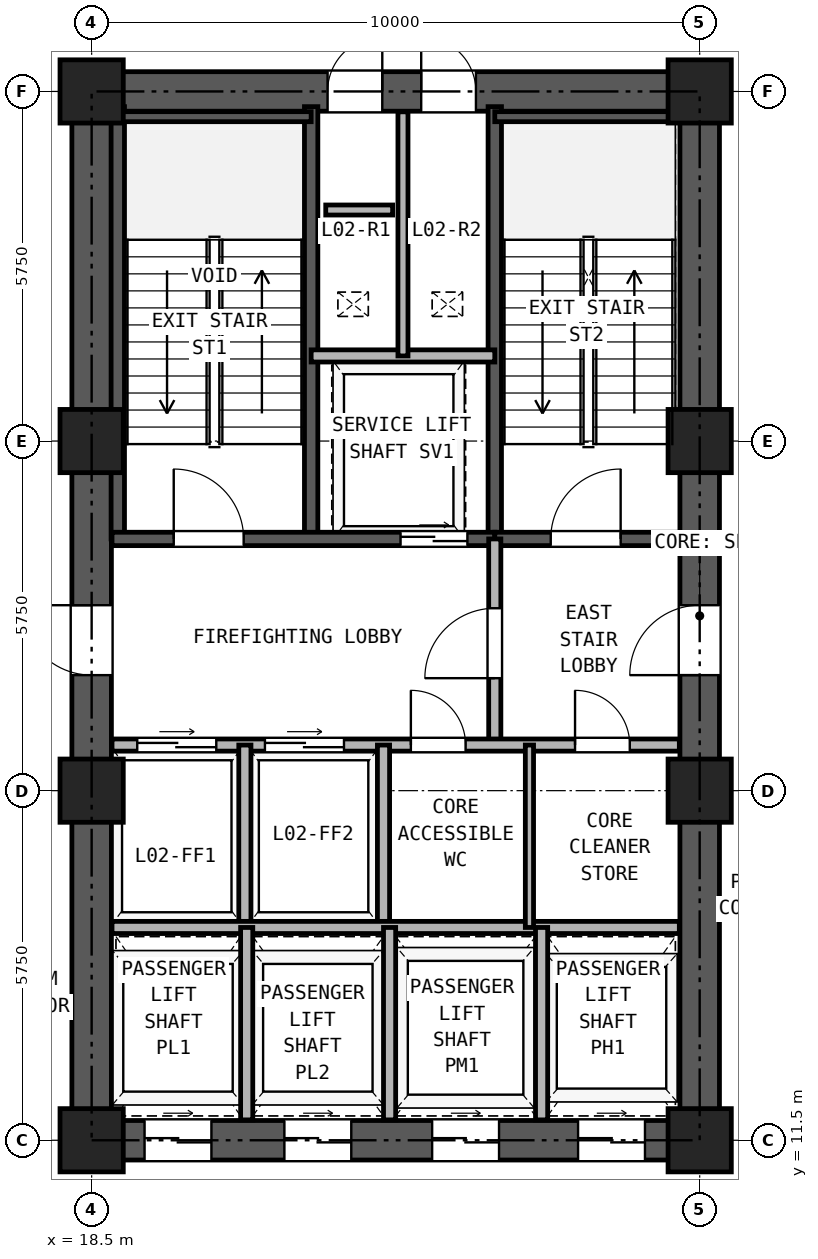
"""IFC4 building model, lengths in metres.
Left out: names, types, materials, properties, quantities, classifications, styles, units other than length and angle.
Written with IfcOpenShell. Run it as: python <this file> out.ifc"""

import sys

from ifc_helpers import new_model, si_unit, direction, frame, frame_2d, origin, origin_2d, place, context, subcontext, project, spatial, rectangle, hollow_rectangle, extrude, source, transform, mapped, element, fill, save


model = new_model("IFC4")
c1 = context("Model", 3, precision=1e-05, world=origin(), true_north=direction((0.0, 1.0)))
c2 = subcontext(c1, "Body", "Model", "MODEL_VIEW")
j1 = project(units=[si_unit("LENGTHUNIT", "METRE"), si_unit("PLANEANGLEUNIT", "RADIAN")], contexts=[c1])
p1 = place(None, origin())
s1 = spatial("IfcSite", under=j1, at=p1, CompositionType="ELEMENT")
p2 = place(p1, origin())
s2 = spatial("IfcBuilding", under=s1, at=p2, CompositionType="ELEMENT")
p3 = place(p2, frame((0.0, 0.0, 9.0)))
s3 = spatial("IfcBuildingStorey", under=s2, at=p3, CompositionType="ELEMENT", Elevation=9.0)
m1 = source(origin(), c2, "Body", "SweptSolid", [
    extrude(hollow_rectangle(XDim=1.04, YDim=1.04, WallThickness=0.065, at=origin_2d()), origin(), (0.0, 0.0, 1.0), 4.18),
])
for number, where, z_axis, x_axis in (
    (1, (18.5, 11.5, 0.0), (0.0, 0.0, 1.0), (1.0, 0.0, 0.0)),
    (2, (18.5, 17.25, 0.0), (0.0, 0.0, 1.0), (1.0, 0.0, 0.0)),
    (3, (18.5, 23.0, 0.0), (0.0, 0.0, 1.0), (1.0, 0.0, 0.0)),
    (4, (18.5, 28.75, 0.0), (0.0, 0.0, 1.0), (1.0, 0.0, 0.0)),
    (5, (28.5, 11.5, 0.0), (0.0, 0.0, 1.0), (1.0, 0.0, 0.0)),
    (6, (28.5, 17.25, 0.0), (0.0, 0.0, 1.0), (1.0, 0.0, 0.0)),
    (7, (28.5, 23.0, 0.0), (0.0, 0.0, 1.0), (1.0, 0.0, 0.0)),
    (8, (28.5, 28.75, 0.0), (0.0, 0.0, 1.0), (1.0, 0.0, 0.0)),
):
    element("IfcColumn", number, at=place(p3, frame(where, z_axis=z_axis, x_axis=x_axis)), inside=s3, PredefinedType="COLUMN", context=c2, shape_type="MappedRepresentation", body=[
        mapped(m1, transform((0.0, 0.0, 0.0), x_axis=(1.0, 0.0, 0.0), y_axis=(0.0, 1.0, 0.0), z_axis=(0.0, 0.0, 1.0), scale=1.0)),
    ])
p4 = place(p3, frame((18.175, 11.5, 0.0), z_axis=(0.0, 0.0, 1.0), x_axis=(1.0, 0.0, 0.0)))
e9 = element("IfcWall", 9, at=p4, inside=s3, PredefinedType="SHEAR", context=c2, shape_type="SweptSolid", body=[
    extrude(rectangle(XDim=10.65, YDim=0.65, at=frame_2d((5.325, 0.0))), origin(), (0.0, 0.0, 1.0), 4.18),
])
p5 = place(p4, frame((1.195, 0.0, 0.0)))
e10 = element("IfcOpeningElement", 10, at=p5, cuts=e9, PredefinedType="OPENING", context=c2, shape_type="SweptSolid", body=[
    extrude(rectangle(XDim=1.1, YDim=2.25, at=frame_2d((0.55, 1.125))), frame((0.0, 0.335, 0.0), z_axis=(0.0, -1.0, 0.0), x_axis=(1.0, 0.0, 0.0)), (0.0, 0.0, 1.0), 0.67),
])
p6 = place(p4, frame((3.495, 0.0, 0.0)))
e11 = element("IfcOpeningElement", 11, at=p6, cuts=e9, PredefinedType="OPENING", context=c2, shape_type="SweptSolid", body=[
    extrude(rectangle(XDim=1.1, YDim=2.25, at=frame_2d((0.55, 1.125))), frame((0.0, 0.335, 0.0), z_axis=(0.0, -1.0, 0.0), x_axis=(1.0, 0.0, 0.0)), (0.0, 0.0, 1.0), 0.67),
])
p7 = place(p4, frame((5.925, 0.0, 0.0)))
e12 = element("IfcOpeningElement", 12, at=p7, cuts=e9, PredefinedType="OPENING", context=c2, shape_type="SweptSolid", body=[
    extrude(rectangle(XDim=1.1, YDim=2.25, at=frame_2d((0.55, 1.125))), frame((0.0, 0.335, 0.0), z_axis=(0.0, -1.0, 0.0), x_axis=(1.0, 0.0, 0.0)), (0.0, 0.0, 1.0), 0.67),
])
p8 = place(p4, frame((8.325, 0.0, 0.0)))
e13 = element("IfcOpeningElement", 13, at=p8, cuts=e9, PredefinedType="OPENING", context=c2, shape_type="SweptSolid", body=[
    extrude(rectangle(XDim=1.1, YDim=2.25, at=frame_2d((0.55, 1.125))), frame((0.0, 0.335, 0.0), z_axis=(0.0, -1.0, 0.0), x_axis=(1.0, 0.0, 0.0)), (0.0, 0.0, 1.0), 0.67),
])
p9 = place(p3, frame((18.175, 28.75, 0.0), z_axis=(0.0, 0.0, 1.0), x_axis=(1.0, 0.0, 0.0)))
e14 = element("IfcWall", 14, at=p9, inside=s3, PredefinedType="SHEAR", context=c2, shape_type="SweptSolid", body=[
    extrude(rectangle(XDim=10.65, YDim=0.65, at=frame_2d((5.325, 0.0))), origin(), (0.0, 0.0, 1.0), 4.18),
])
p10 = place(p9, frame((4.205, 0.0, 0.0)))
e15 = element("IfcOpeningElement", 15, at=p10, cuts=e14, PredefinedType="OPENING", context=c2, shape_type="SweptSolid", body=[
    extrude(rectangle(XDim=0.9, YDim=2.05, at=frame_2d((0.45, 1.025))), frame((0.0, 0.335, 0.0), z_axis=(0.0, -1.0, 0.0), x_axis=(1.0, 0.0, 0.0)), (0.0, 0.0, 1.0), 0.67),
])
p11 = place(p9, frame((5.745, 0.0, 0.0)))
e16 = element("IfcOpeningElement", 16, at=p11, cuts=e14, PredefinedType="OPENING", context=c2, shape_type="SweptSolid", body=[
    extrude(rectangle(XDim=0.9, YDim=2.05, at=frame_2d((0.45, 1.025))), frame((0.0, 0.335, 0.0), z_axis=(0.0, -1.0, 0.0), x_axis=(1.0, 0.0, 0.0)), (0.0, 0.0, 1.0), 0.67),
])
p12 = place(p3, frame((18.5, 11.825, 0.0), z_axis=(0.0, 0.0, 1.0), x_axis=(0.0, 1.0, 0.0)))
e17 = element("IfcWall", 17, at=p12, inside=s3, PredefinedType="SHEAR", context=c2, shape_type="SweptSolid", body=[
    extrude(rectangle(XDim=16.6, YDim=0.65, at=frame_2d((8.3, 0.0))), origin(), (0.0, 0.0, 1.0), 4.18),
])
p13 = place(p12, frame((7.325, 0.0, 0.0)))
e18 = element("IfcOpeningElement", 18, at=p13, cuts=e17, PredefinedType="OPENING", context=c2, shape_type="SweptSolid", body=[
    extrude(rectangle(XDim=1.15, YDim=2.2, at=frame_2d((0.575, 1.1))), frame((0.0, 0.335, 0.0), z_axis=(0.0, -1.0, 0.0), x_axis=(1.0, 0.0, 0.0)), (0.0, 0.0, 1.0), 0.67),
])
p14 = place(p3, frame((28.5, 11.825, 0.0), z_axis=(0.0, 0.0, 1.0), x_axis=(0.0, 1.0, 0.0)))
e19 = element("IfcWall", 19, at=p14, inside=s3, PredefinedType="SHEAR", context=c2, shape_type="SweptSolid", body=[
    extrude(rectangle(XDim=16.6, YDim=0.65, at=frame_2d((8.3, 0.0))), origin(), (0.0, 0.0, 1.0), 4.18),
])
p15 = place(p14, frame((7.325, 0.0, 0.0)))
e20 = element("IfcOpeningElement", 20, at=p15, cuts=e19, PredefinedType="OPENING", context=c2, shape_type="SweptSolid", body=[
    extrude(rectangle(XDim=1.15, YDim=2.2, at=frame_2d((0.575, 1.1))), frame((0.0, 0.335, 0.0), z_axis=(0.0, -1.0, 0.0), x_axis=(1.0, 0.0, 0.0)), (0.0, 0.0, 1.0), 0.67),
])
for number, where, z_axis, x_axis in (
    (21, (18.93, 21.39, 0.0), (0.0, 0.0, 1.0), (0.0, 1.0, 0.0)),
    (22, (22.11, 21.39, 0.0), (0.0, 0.0, 1.0), (0.0, 1.0, 0.0)),
    (23, (25.13, 21.39, 0.0), (0.0, 0.0, 1.0), (0.0, 1.0, 0.0)),
):
    element("IfcWall", number, at=place(p3, frame(where, z_axis=z_axis, x_axis=x_axis)), inside=s3, PredefinedType="SOLIDWALL", context=c2, shape_type="SweptSolid", body=[
        extrude(rectangle(XDim=7.11, YDim=0.22, at=frame_2d((3.555, 0.0))), origin(), (0.0, 0.0, 1.0), 4.18),
    ])
p16 = place(p3, frame((18.835, 28.335, 0.0), z_axis=(0.0, 0.0, 1.0), x_axis=(1.0, 0.0, 0.0)))
e24 = element("IfcWall", 24, at=p16, inside=s3, PredefinedType="PARTITIONING", context=c2, shape_type="SweptSolid", body=[
    extrude(rectangle(XDim=3.275, YDim=0.165, at=frame_2d((1.638, 0.0))), origin(), (0.0, 0.0, 1.0), 4.18),
])
p17 = place(p3, frame((25.13, 28.335, 0.0), z_axis=(0.0, 0.0, 1.0), x_axis=(1.0, 0.0, 0.0)))
e25 = element("IfcWall", 25, at=p17, inside=s3, PredefinedType="PARTITIONING", context=c2, shape_type="SweptSolid", body=[
    extrude(rectangle(XDim=3.035, YDim=0.165, at=frame_2d((1.518, 0.0))), origin(), (0.0, 0.0, 1.0), 4.18),
])
p18 = place(p3, frame((18.835, 21.39, 0.0), z_axis=(0.0, 0.0, 1.0), x_axis=(1.0, 0.0, 0.0)))
e26 = element("IfcWall", 26, at=p18, inside=s3, PredefinedType="SOLIDWALL", context=c2, shape_type="SweptSolid", body=[
    extrude(rectangle(XDim=6.295, YDim=0.22, at=frame_2d((3.147, 0.0))), origin(), (0.0, 0.0, 1.0), 4.18),
])
p19 = place(p18, frame((1.015, 0.0, 0.0)))
e27 = element("IfcOpeningElement", 27, at=p19, cuts=e26, PredefinedType="OPENING", context=c2, shape_type="SweptSolid", body=[
    extrude(rectangle(XDim=1.15, YDim=2.2, at=frame_2d((0.575, 1.1))), frame((0.0, 0.12, 0.0), z_axis=(0.0, -1.0, 0.0), x_axis=(1.0, 0.0, 0.0)), (0.0, 0.0, 1.0), 0.24),
])
p20 = place(p18, frame((4.745, 0.0, 0.0)))
e28 = element("IfcOpeningElement", 28, at=p20, cuts=e26, PredefinedType="OPENING", context=c2, shape_type="SweptSolid", body=[
    extrude(rectangle(XDim=1.1, YDim=2.25, at=frame_2d((0.55, 1.125))), frame((0.0, 0.12, 0.0), z_axis=(0.0, -1.0, 0.0), x_axis=(1.0, 0.0, 0.0)), (0.0, 0.0, 1.0), 0.24),
])
p21 = place(p3, frame((25.13, 21.39, 0.0), z_axis=(0.0, 0.0, 1.0), x_axis=(1.0, 0.0, 0.0)))
e29 = element("IfcWall", 29, at=p21, inside=s3, PredefinedType="SOLIDWALL", context=c2, shape_type="SweptSolid", body=[
    extrude(rectangle(XDim=3.035, YDim=0.22, at=frame_2d((1.518, 0.0))), origin(), (0.0, 0.0, 1.0), 4.18),
])
p22 = place(p21, frame((0.92, 0.0, 0.0)))
e30 = element("IfcOpeningElement", 30, at=p22, cuts=e29, PredefinedType="OPENING", context=c2, shape_type="SweptSolid", body=[
    extrude(rectangle(XDim=1.15, YDim=2.2, at=frame_2d((0.575, 1.1))), frame((0.0, 0.12, 0.0), z_axis=(0.0, -1.0, 0.0), x_axis=(1.0, 0.0, 0.0)), (0.0, 0.0, 1.0), 0.24),
])
p23 = place(p3, frame((22.11, 24.4, 0.0), z_axis=(0.0, 0.0, 1.0), x_axis=(1.0, 0.0, 0.0)))
e31 = element("IfcWall", 31, at=p23, inside=s3, PredefinedType="PARTITIONING", context=c2, shape_type="SweptSolid", body=[
    extrude(rectangle(XDim=3.02, YDim=0.2, at=frame_2d((1.51, 0.0))), origin(), (0.0, 0.0, 1.0), 4.18),
])
p24 = place(p3, frame((23.62, 24.4, 0.0), z_axis=(0.0, 0.0, 1.0), x_axis=(0.0, 1.0, 0.0)))
e32 = element("IfcWall", 32, at=p24, inside=s3, PredefinedType="PARTITIONING", context=c2, shape_type="SweptSolid", body=[
    extrude(rectangle(XDim=4.015, YDim=0.165, at=frame_2d((2.008, 0.0))), origin(), (0.0, 0.0, 1.0), 4.18),
])
p25 = place(p3, frame((25.13, 18.0, 0.0), z_axis=(0.0, 0.0, 1.0), x_axis=(0.0, 1.0, 0.0)))
e33 = element("IfcWall", 33, at=p25, inside=s3, PredefinedType="PARTITIONING", context=c2, shape_type="SweptSolid", body=[
    extrude(rectangle(XDim=3.39, YDim=0.2, at=frame_2d((1.695, 0.0))), origin(), (0.0, 0.0, 1.0), 4.18),
])
p26 = place(p25, frame((1.1, 0.0, 0.0)))
e34 = element("IfcOpeningElement", 34, at=p26, cuts=e33, PredefinedType="OPENING", context=c2, shape_type="SweptSolid", body=[
    extrude(rectangle(XDim=1.15, YDim=2.2, at=frame_2d((0.575, 1.1))), frame((0.0, 0.11, 0.0), z_axis=(0.0, -1.0, 0.0), x_axis=(1.0, 0.0, 0.0)), (0.0, 0.0, 1.0), 0.22),
])
p27 = place(p3, frame((18.835, 18.0, 0.0), z_axis=(0.0, 0.0, 1.0), x_axis=(1.0, 0.0, 0.0)))
e35 = element("IfcWall", 35, at=p27, inside=s3, PredefinedType="PARTITIONING", context=c2, shape_type="SweptSolid", body=[
    extrude(rectangle(XDim=9.33, YDim=0.2, at=frame_2d((4.665, 0.0))), origin(), (0.0, 0.0, 1.0), 4.18),
])
p28 = place(p27, frame((0.415, 0.0, 0.0)))
e36 = element("IfcOpeningElement", 36, at=p28, cuts=e35, PredefinedType="OPENING", context=c2, shape_type="SweptSolid", body=[
    extrude(rectangle(XDim=1.3, YDim=2.3, at=frame_2d((0.65, 1.15))), frame((0.0, 0.11, 0.0), z_axis=(0.0, -1.0, 0.0), x_axis=(1.0, 0.0, 0.0)), (0.0, 0.0, 1.0), 0.22),
])
p29 = place(p27, frame((2.515, 0.0, 0.0)))
e37 = element("IfcOpeningElement", 37, at=p29, cuts=e35, PredefinedType="OPENING", context=c2, shape_type="SweptSolid", body=[
    extrude(rectangle(XDim=1.3, YDim=2.3, at=frame_2d((0.65, 1.15))), frame((0.0, 0.11, 0.0), z_axis=(0.0, -1.0, 0.0), x_axis=(1.0, 0.0, 0.0)), (0.0, 0.0, 1.0), 0.22),
])
p30 = place(p27, frame((4.915, 0.0, 0.0)))
e38 = element("IfcOpeningElement", 38, at=p30, cuts=e35, PredefinedType="OPENING", context=c2, shape_type="SweptSolid", body=[
    extrude(rectangle(XDim=0.9, YDim=2.05, at=frame_2d((0.45, 1.025))), frame((0.0, 0.11, 0.0), z_axis=(0.0, -1.0, 0.0), x_axis=(1.0, 0.0, 0.0)), (0.0, 0.0, 1.0), 0.22),
])
p31 = place(p27, frame((7.615, 0.0, 0.0)))
e39 = element("IfcOpeningElement", 39, at=p31, cuts=e35, PredefinedType="OPENING", context=c2, shape_type="SweptSolid", body=[
    extrude(rectangle(XDim=0.9, YDim=2.05, at=frame_2d((0.45, 1.025))), frame((0.0, 0.11, 0.0), z_axis=(0.0, -1.0, 0.0), x_axis=(1.0, 0.0, 0.0)), (0.0, 0.0, 1.0), 0.22),
])
for number, where, z_axis, x_axis in (
    (40, (21.02, 15.0, 0.0), (0.0, 0.0, 1.0), (0.0, 1.0, 0.0)),
    (41, (23.3, 15.0, 0.0), (0.0, 0.0, 1.0), (0.0, 1.0, 0.0)),
):
    element("IfcWall", number, at=place(p3, frame(where, z_axis=z_axis, x_axis=x_axis)), inside=s3, PredefinedType="PARTITIONING", context=c2, shape_type="SweptSolid", body=[
        extrude(rectangle(XDim=3.0, YDim=0.2, at=frame_2d((1.5, 0.0))), origin(), (0.0, 0.0, 1.0), 4.18),
    ])
p32 = place(p3, frame((18.835, 15.0, 0.0), z_axis=(0.0, 0.0, 1.0), x_axis=(1.0, 0.0, 0.0)))
e42 = element("IfcWall", 42, at=p32, inside=s3, PredefinedType="PARTITIONING", context=c2, shape_type="SweptSolid", body=[
    extrude(rectangle(XDim=9.33, YDim=0.2, at=frame_2d((4.665, 0.0))), origin(), (0.0, 0.0, 1.0), 4.18),
])
p33 = place(p3, frame((25.7, 15.0, 0.0), z_axis=(0.0, 0.0, 1.0), x_axis=(0.0, 1.0, 0.0)))
e43 = element("IfcWall", 43, at=p33, inside=s3, PredefinedType="PARTITIONING", context=c2, shape_type="SweptSolid", body=[
    extrude(rectangle(XDim=3.0, YDim=0.135, at=frame_2d((1.5, 0.0))), origin(), (0.0, 0.0, 1.0), 4.18),
])
for number, where, z_axis, x_axis in (
    (44, (21.05, 11.835, 0.0), (0.0, 0.0, 1.0), (0.0, 1.0, 0.0)),
    (45, (23.4, 11.835, 0.0), (0.0, 0.0, 1.0), (0.0, 1.0, 0.0)),
    (46, (25.9, 11.835, 0.0), (0.0, 0.0, 1.0), (0.0, 1.0, 0.0)),
):
    element("IfcWall", number, at=place(p3, frame(where, z_axis=z_axis, x_axis=x_axis)), inside=s3, PredefinedType="PARTITIONING", context=c2, shape_type="SweptSolid", body=[
        extrude(rectangle(XDim=3.165, YDim=0.2, at=frame_2d((1.583, 0.0))), origin(), (0.0, 0.0, 1.0), 4.18),
    ])
p34 = place(p3, frame((22.35, 26.8, 0.0), z_axis=(0.0, 0.0, 1.0), x_axis=(1.0, 0.0, 0.0)))
e47 = element("IfcWall", 47, at=p34, inside=s3, PredefinedType="PARTITIONING", context=c2, shape_type="SweptSolid", body=[
    extrude(rectangle(XDim=1.1, YDim=0.165, at=frame_2d((0.55, 0.0))), origin(), (0.0, 0.0, 1.0), 4.18),
])
p35 = place(p19, frame((1.15, 0.0, 0.0), z_axis=(0.0, 0.0, 1.0), x_axis=(-1.0, 0.0, 0.0)))
e48 = element("IfcDoor", 48, at=p35, inside=s3, OperationType="SINGLE_SWING_LEFT", PredefinedType="DOOR", context=c2, shape_type="SweptSolid", body=[
    extrude(rectangle(XDim=1.15, YDim=2.2, at=frame_2d((0.575, 1.1))), frame((0.0, 0.025, 0.0), z_axis=(0.0, -1.0, 0.0), x_axis=(1.0, 0.0, 0.0)), (0.0, 0.0, 1.0), 0.05),
])
fill(e27, e48)
p36 = place(p22, frame((1.15, 0.0, 0.0), z_axis=(0.0, 0.0, 1.0), x_axis=(-1.0, 0.0, 0.0)))
e49 = element("IfcDoor", 49, at=p36, inside=s3, OperationType="SINGLE_SWING_RIGHT", PredefinedType="DOOR", context=c2, shape_type="SweptSolid", body=[
    extrude(rectangle(XDim=1.15, YDim=2.2, at=frame_2d((0.575, 1.1))), frame((0.0, 0.025, 0.0), z_axis=(0.0, -1.0, 0.0), x_axis=(1.0, 0.0, 0.0)), (0.0, 0.0, 1.0), 0.05),
])
fill(e30, e49)
p37 = place(p20, frame((1.1, 0.0, 0.0), z_axis=(0.0, 0.0, 1.0), x_axis=(-1.0, 0.0, 0.0)))
e50 = element("IfcDoor", 50, at=p37, inside=s3, OperationType="DOUBLE_DOOR_SLIDING", PredefinedType="DOOR", context=c2, shape_type="SweptSolid", body=[
    extrude(rectangle(XDim=1.1, YDim=2.25, at=frame_2d((0.55, 1.125))), frame((0.0, 0.025, 0.0), z_axis=(0.0, -1.0, 0.0), x_axis=(1.0, 0.0, 0.0)), (0.0, 0.0, 1.0), 0.05),
])
fill(e28, e50)
p38 = place(p26, origin())
e51 = element("IfcDoor", 51, at=p38, inside=s3, OperationType="SINGLE_SWING_LEFT", PredefinedType="DOOR", context=c2, shape_type="SweptSolid", body=[
    extrude(rectangle(XDim=1.15, YDim=2.2, at=frame_2d((0.575, 1.1))), frame((0.0, 0.025, 0.0), z_axis=(0.0, -1.0, 0.0), x_axis=(1.0, 0.0, 0.0)), (0.0, 0.0, 1.0), 0.05),
])
fill(e34, e51)
p39 = place(p28, origin())
e52 = element("IfcDoor", 52, at=p39, inside=s3, OperationType="DOUBLE_DOOR_SLIDING", PredefinedType="DOOR", context=c2, shape_type="SweptSolid", body=[
    extrude(rectangle(XDim=1.3, YDim=2.3, at=frame_2d((0.65, 1.15))), frame((0.0, 0.025, 0.0), z_axis=(0.0, -1.0, 0.0), x_axis=(1.0, 0.0, 0.0)), (0.0, 0.0, 1.0), 0.05),
])
fill(e36, e52)
p40 = place(p29, origin())
e53 = element("IfcDoor", 53, at=p40, inside=s3, OperationType="DOUBLE_DOOR_SLIDING", PredefinedType="DOOR", context=c2, shape_type="SweptSolid", body=[
    extrude(rectangle(XDim=1.3, YDim=2.3, at=frame_2d((0.65, 1.15))), frame((0.0, 0.025, 0.0), z_axis=(0.0, -1.0, 0.0), x_axis=(1.0, 0.0, 0.0)), (0.0, 0.0, 1.0), 0.05),
])
fill(e37, e53)
p41 = place(p30, frame((0.9, 0.0, 0.0), z_axis=(0.0, 0.0, 1.0), x_axis=(-1.0, 0.0, 0.0)))
e54 = element("IfcDoor", 54, at=p41, inside=s3, OperationType="SINGLE_SWING_LEFT", PredefinedType="DOOR", context=c2, shape_type="SweptSolid", body=[
    extrude(rectangle(XDim=0.9, YDim=2.05, at=frame_2d((0.45, 1.025))), frame((0.0, 0.025, 0.0), z_axis=(0.0, -1.0, 0.0), x_axis=(1.0, 0.0, 0.0)), (0.0, 0.0, 1.0), 0.05),
])
fill(e38, e54)
p42 = place(p31, frame((0.9, 0.0, 0.0), z_axis=(0.0, 0.0, 1.0), x_axis=(-1.0, 0.0, 0.0)))
e55 = element("IfcDoor", 55, at=p42, inside=s3, OperationType="SINGLE_SWING_LEFT", PredefinedType="DOOR", context=c2, shape_type="SweptSolid", body=[
    extrude(rectangle(XDim=0.9, YDim=2.05, at=frame_2d((0.45, 1.025))), frame((0.0, 0.025, 0.0), z_axis=(0.0, -1.0, 0.0), x_axis=(1.0, 0.0, 0.0)), (0.0, 0.0, 1.0), 0.05),
])
fill(e39, e55)
p43 = place(p13, frame((1.15, 0.0, 0.0), z_axis=(0.0, 0.0, 1.0), x_axis=(-1.0, 0.0, 0.0)))
e56 = element("IfcDoor", 56, at=p43, inside=s3, OperationType="SINGLE_SWING_RIGHT", PredefinedType="DOOR", context=c2, shape_type="SweptSolid", body=[
    extrude(rectangle(XDim=1.15, YDim=2.2, at=frame_2d((0.575, 1.1))), frame((0.0, 0.025, 0.0), z_axis=(0.0, -1.0, 0.0), x_axis=(1.0, 0.0, 0.0)), (0.0, 0.0, 1.0), 0.05),
])
fill(e18, e56)
p44 = place(p15, origin())
e57 = element("IfcDoor", 57, at=p44, inside=s3, OperationType="SINGLE_SWING_LEFT", PredefinedType="DOOR", context=c2, shape_type="SweptSolid", body=[
    extrude(rectangle(XDim=1.15, YDim=2.2, at=frame_2d((0.575, 1.1))), frame((0.0, 0.025, 0.0), z_axis=(0.0, -1.0, 0.0), x_axis=(1.0, 0.0, 0.0)), (0.0, 0.0, 1.0), 0.05),
])
fill(e20, e57)
p45 = place(p10, origin())
e58 = element("IfcDoor", 58, at=p45, inside=s3, OperationType="SINGLE_SWING_RIGHT", PredefinedType="DOOR", context=c2, shape_type="SweptSolid", body=[
    extrude(rectangle(XDim=0.9, YDim=2.05, at=frame_2d((0.45, 1.025))), frame((0.0, 0.025, 0.0), z_axis=(0.0, -1.0, 0.0), x_axis=(1.0, 0.0, 0.0)), (0.0, 0.0, 1.0), 0.05),
])
fill(e15, e58)
p46 = place(p11, origin())
e59 = element("IfcDoor", 59, at=p46, inside=s3, OperationType="SINGLE_SWING_LEFT", PredefinedType="DOOR", context=c2, shape_type="SweptSolid", body=[
    extrude(rectangle(XDim=0.9, YDim=2.05, at=frame_2d((0.45, 1.025))), frame((0.0, 0.025, 0.0), z_axis=(0.0, -1.0, 0.0), x_axis=(1.0, 0.0, 0.0)), (0.0, 0.0, 1.0), 0.05),
])
fill(e16, e59)
p47 = place(p5, frame((1.1, 0.0, 0.0), z_axis=(0.0, 0.0, 1.0), x_axis=(-1.0, 0.0, 0.0)))
e60 = element("IfcDoor", 60, at=p47, inside=s3, OperationType="DOUBLE_DOOR_SLIDING", PredefinedType="DOOR", context=c2, shape_type="SweptSolid", body=[
    extrude(rectangle(XDim=1.1, YDim=2.25, at=frame_2d((0.55, 1.125))), frame((0.0, 0.025, 0.0), z_axis=(0.0, -1.0, 0.0), x_axis=(1.0, 0.0, 0.0)), (0.0, 0.0, 1.0), 0.05),
])
fill(e10, e60)
p48 = place(p6, frame((1.1, 0.0, 0.0), z_axis=(0.0, 0.0, 1.0), x_axis=(-1.0, 0.0, 0.0)))
e61 = element("IfcDoor", 61, at=p48, inside=s3, OperationType="DOUBLE_DOOR_SLIDING", PredefinedType="DOOR", context=c2, shape_type="SweptSolid", body=[
    extrude(rectangle(XDim=1.1, YDim=2.25, at=frame_2d((0.55, 1.125))), frame((0.0, 0.025, 0.0), z_axis=(0.0, -1.0, 0.0), x_axis=(1.0, 0.0, 0.0)), (0.0, 0.0, 1.0), 0.05),
])
fill(e11, e61)
p49 = place(p7, frame((1.1, 0.0, 0.0), z_axis=(0.0, 0.0, 1.0), x_axis=(-1.0, 0.0, 0.0)))
e62 = element("IfcDoor", 62, at=p49, inside=s3, OperationType="DOUBLE_DOOR_SLIDING", PredefinedType="DOOR", context=c2, shape_type="SweptSolid", body=[
    extrude(rectangle(XDim=1.1, YDim=2.25, at=frame_2d((0.55, 1.125))), frame((0.0, 0.025, 0.0), z_axis=(0.0, -1.0, 0.0), x_axis=(1.0, 0.0, 0.0)), (0.0, 0.0, 1.0), 0.05),
])
fill(e12, e62)
p50 = place(p8, frame((1.1, 0.0, 0.0), z_axis=(0.0, 0.0, 1.0), x_axis=(-1.0, 0.0, 0.0)))
e63 = element("IfcDoor", 63, at=p50, inside=s3, OperationType="DOUBLE_DOOR_SLIDING", PredefinedType="DOOR", context=c2, shape_type="SweptSolid", body=[
    extrude(rectangle(XDim=1.1, YDim=2.25, at=frame_2d((0.55, 1.125))), frame((0.0, 0.025, 0.0), z_axis=(0.0, -1.0, 0.0), x_axis=(1.0, 0.0, 0.0)), (0.0, 0.0, 1.0), 0.05),
])
fill(e13, e63)
save(model, sys.argv[1])
